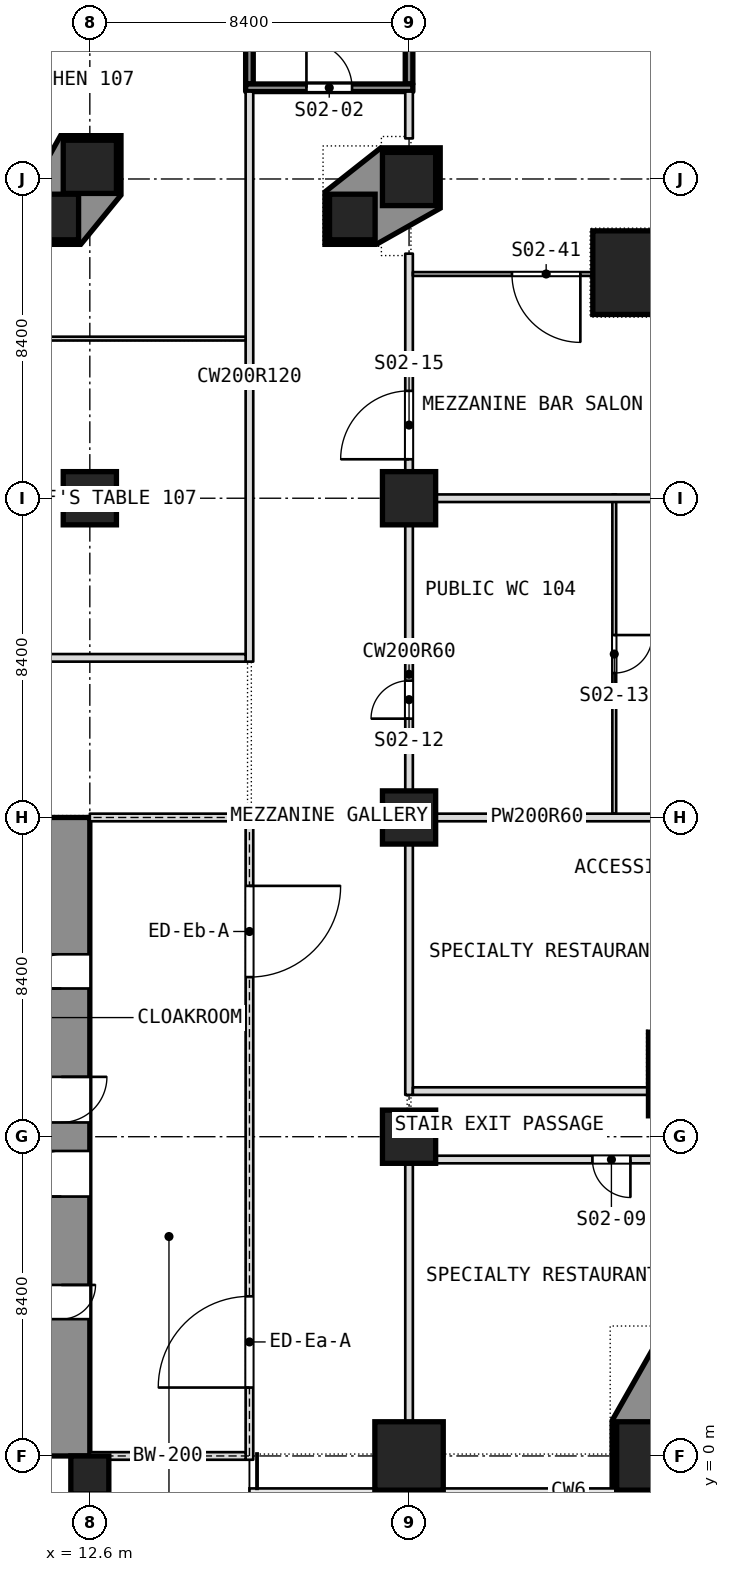
"""IFC4 building model, lengths in metres.
Left out: names, types, materials, properties, quantities, classifications, styles, units other than length and angle.
Written with IfcOpenShell. Run it as: python <this file> out.ifc"""

import sys

from ifc_helpers import new_model, si_unit, direction, frame, frame_2d, origin, origin_2d, place, context, subcontext, project, spatial, polyline, rectangle, outline, extrude, element, fill, save


model = new_model("IFC4")
c1 = context("Model", 3, precision=1e-05, world=origin(), true_north=direction((0.0, 1.0)))
c2 = subcontext(c1, "Body", "Model", "MODEL_VIEW")
j1 = project(units=[si_unit("LENGTHUNIT", "METRE"), si_unit("PLANEANGLEUNIT", "RADIAN")], contexts=[c1])
p1 = place(None, origin())
s1 = spatial("IfcSite", under=j1, at=p1, CompositionType="ELEMENT")
p2 = place(p1, origin())
s2 = spatial("IfcBuilding", under=s1, at=p2, CompositionType="ELEMENT")
p3 = place(p2, frame((0.0, 0.0, 8.0)))
s3 = spatial("IfcBuildingStorey", under=s2, at=p3, CompositionType="ELEMENT", Elevation=8.0)
p4 = place(p3, frame((21.0, 0.0, 0.0), z_axis=(0.0, 0.0, 1.0), x_axis=(1.0, 0.0, 0.0)))
e1 = element("IfcColumn", 1, at=p4, inside=s3, PredefinedType="COLUMN", context=c2, shape_type="SweptSolid", body=[
    extrude(rectangle(XDim=1.8, YDim=1.8, at=origin_2d()), origin(), (0.0, 0.0, 1.0), 5.0),
])
for number, where, z_axis, x_axis in (
    (2, (21.0, 8.4, 0.0), (0.0, 0.0, 1.0), (1.0, 0.0, 0.0)),
    (3, (21.0, 16.8, 0.0), (0.0, 0.0, 1.0), (1.0, 0.0, 0.0)),
    (4, (12.6, 25.2, 0.0), (0.0, 0.0, 1.0), (1.0, 0.0, 0.0)),
    (5, (21.0, 25.2, 0.0), (0.0, 0.0, 1.0), (1.0, 0.0, 0.0)),
    (6, (12.6, 33.92, 0.0), (0.0, 0.0, 1.0), (1.0, 0.0, 0.0)),
    (7, (21.0, 33.6, 0.0), (0.0, 0.0, 1.0), (1.0, 0.0, 0.0)),
):
    element("IfcColumn", number, at=place(p3, frame(where, z_axis=z_axis, x_axis=x_axis)), inside=s3, PredefinedType="COLUMN", context=c2, shape_type="SweptSolid", body=[
        extrude(rectangle(XDim=1.4, YDim=1.4, at=origin_2d()), origin(), (0.0, 0.0, 1.0), 5.0),
    ])
p5 = place(p3, frame((27.363, 0.0, 0.0), z_axis=(0.0, 0.0, 1.0), x_axis=(1.0, 0.0, 0.0)))
e8 = element("IfcColumn", 8, at=p5, inside=s3, PredefinedType="COLUMN", context=c2, shape_type="SweptSolid", body=[
    extrude(rectangle(XDim=1.8, YDim=1.8, at=origin_2d()), origin(), (0.0, 0.0, 1.0), 5.0),
])
for number, where, z_axis, x_axis in (
    (9, (28.4, 10.05, 0.0), (0.0, 0.0, 1.0), (1.0, 0.0, 0.0)),
    (10, (26.936, 31.135, 0.0), (0.0, 0.0, 1.0), (1.0, 0.0, 0.0)),
):
    element("IfcColumn", number, at=place(p3, frame(where, z_axis=z_axis, x_axis=x_axis)), inside=s3, PredefinedType="COLUMN", context=c2, shape_type="SweptSolid", body=[
        extrude(rectangle(XDim=2.2, YDim=2.2, at=origin_2d()), origin(), (0.0, 0.0, 1.0), 5.0),
    ])
p6 = place(p3, frame((11.85, 0.0, 0.0), z_axis=(0.0, 0.0, 1.0), x_axis=(0.0, 1.0, 0.0)))
e11 = element("IfcWall", 11, at=p6, inside=s3, PredefinedType="SHEAR", context=c2, shape_type="SweptSolid", body=[
    extrude(rectangle(XDim=16.8, YDim=1.5, at=frame_2d((8.4, 0.0))), origin(), (0.0, 0.0, 1.0), 5.0),
])
p7 = place(p6, frame((3.6, 0.0, 0.0)))
e12 = element("IfcOpeningElement", 12, at=p7, cuts=e11, PredefinedType="OPENING", context=c2, shape_type="SweptSolid", body=[
    extrude(rectangle(XDim=0.9, YDim=2.1, at=frame_2d((0.45, 1.05))), frame((0.0, 0.75, 0.0), z_axis=(0.0, -1.0, 0.0), x_axis=(1.0, 0.0, 0.0)), (0.0, 0.0, 1.0), 1.5),
])
p8 = place(p6, frame((6.825, 0.0, 0.0)))
e13 = element("IfcOpeningElement", 13, at=p8, cuts=e11, PredefinedType="OPENING", context=c2, shape_type="SweptSolid", body=[
    extrude(rectangle(XDim=1.2, YDim=2.1, at=frame_2d((0.6, 1.05))), frame((0.0, 0.75, 0.0), z_axis=(0.0, -1.0, 0.0), x_axis=(1.0, 0.0, 0.0)), (0.0, 0.0, 1.0), 1.5),
])
p9 = place(p6, frame((12.3, 0.0, 0.0)))
e14 = element("IfcOpeningElement", 14, at=p9, cuts=e11, PredefinedType="OPENING", context=c2, shape_type="SweptSolid", body=[
    extrude(rectangle(XDim=0.9, YDim=2.1, at=frame_2d((0.45, 1.05))), frame((0.0, 0.75, 0.0), z_axis=(0.0, -1.0, 0.0), x_axis=(1.0, 0.0, 0.0)), (0.0, 0.0, 1.0), 1.5),
])
p10 = place(p6, frame((8.775, 0.0, 0.0)))
e15 = element("IfcOpeningElement", 15, at=p10, cuts=e11, PredefinedType="OPENING", context=c2, shape_type="SweptSolid", body=[
    extrude(rectangle(XDim=1.2, YDim=2.1, at=frame_2d((0.6, 1.05))), frame((0.0, 0.75, 0.0), z_axis=(0.0, -1.0, 0.0), x_axis=(1.0, 0.0, 0.0)), (0.0, 0.0, 1.0), 1.5),
])
for number, where, z_axis, x_axis in (
    (16, (11.704, 32.6, 0.0), (0.0, 0.0, 1.0), (1.0, 0.0, 0.0)),
    (17, (19.507, 32.6, 0.0), (0.0, 0.0, 1.0), (1.0, 0.0, 0.0)),
):
    element("IfcColumn", number, at=place(p3, frame(where, z_axis=z_axis, x_axis=x_axis)), inside=s3, PredefinedType="COLUMN", context=c2, shape_type="SweptSolid", body=[
        extrude(rectangle(XDim=1.2, YDim=1.2, at=origin_2d()), origin(), (0.0, 0.0, 1.0), 5.0),
    ])
p11 = place(p3, frame((12.6, -0.5, 0.0), z_axis=(0.0, 0.0, 1.0), x_axis=(1.0, 0.0, 0.0)))
e18 = element("IfcColumn", 18, at=p11, inside=s3, PredefinedType="COLUMN", context=c2, shape_type="SweptSolid", body=[
    extrude(rectangle(XDim=1.0, YDim=1.0, at=origin_2d()), origin(), (0.0, 0.0, 1.0), 5.0),
])
p12 = place(p3, frame((26.4, 16.9, 0.0), z_axis=(0.0, 0.0, 1.0), x_axis=(0.0, 1.0, 0.0)))
e19 = element("IfcWall", 19, at=p12, inside=s3, PredefinedType="PARTITIONING", context=c2, shape_type="SweptSolid", body=[
    extrude(rectangle(XDim=8.4, YDim=0.1, at=frame_2d((4.2, 0.0))), origin(), (0.0, 0.0, 1.0), 4.68),
])
p13 = place(p12, frame((3.7, 0.0, 0.0)))
e20 = element("IfcOpeningElement", 20, at=p13, cuts=e19, PredefinedType="OPENING", context=c2, shape_type="SweptSolid", body=[
    extrude(rectangle(XDim=1.0, YDim=2.1, at=frame_2d((0.5, 1.05))), frame((0.0, 0.05, 0.0), z_axis=(0.0, -1.0, 0.0), x_axis=(1.0, 0.0, 0.0)), (0.0, 0.0, 1.0), 0.1),
])
p14 = place(p3, frame((21.0, -0.894, 0.0), z_axis=(0.0, 0.0, 1.0), x_axis=(0.0, 1.0, 0.0)))
e21 = element("IfcWall", 21, at=p14, inside=s3, PredefinedType="PARTITIONING", context=c2, shape_type="SweptSolid", body=[
    extrude(rectangle(XDim=8.794, YDim=0.2, at=frame_2d((4.397, 0.0))), origin(), (0.0, 0.0, 1.0), 4.68),
])
p15 = place(p3, frame((21.0, 9.5, 0.0), z_axis=(0.0, 0.0, 1.0), x_axis=(0.0, 1.0, 0.0)))
e22 = element("IfcWall", 22, at=p15, inside=s3, PredefinedType="PARTITIONING", context=c2, shape_type="SweptSolid", body=[
    extrude(rectangle(XDim=22.135, YDim=0.2, at=frame_2d((11.067, 0.0))), origin(), (0.0, 0.0, 1.0), 4.68),
])
p16 = place(p15, frame((9.9, 0.0, 0.0)))
e23 = element("IfcOpeningElement", 23, at=p16, cuts=e22, PredefinedType="OPENING", context=c2, shape_type="SweptSolid", body=[
    extrude(rectangle(XDim=1.0, YDim=2.1, at=frame_2d((0.5, 1.05))), frame((0.0, 0.1, 0.0), z_axis=(0.0, -1.0, 0.0), x_axis=(1.0, 0.0, 0.0)), (0.0, 0.0, 1.0), 0.2),
])
p17 = place(p15, frame((16.725, 0.0, 0.0)))
e24 = element("IfcOpeningElement", 24, at=p17, cuts=e22, PredefinedType="OPENING", context=c2, shape_type="SweptSolid", body=[
    extrude(rectangle(XDim=1.8, YDim=2.1, at=frame_2d((0.9, 1.05))), frame((0.0, 0.1, 0.0), z_axis=(0.0, -1.0, 0.0), x_axis=(1.0, 0.0, 0.0)), (0.0, 0.0, 1.0), 0.2),
])
p18 = place(p3, frame((21.0, 34.668, 0.0), z_axis=(0.0, 0.0, 1.0), x_axis=(0.0, 1.0, 0.0)))
e25 = element("IfcWall", 25, at=p18, inside=s3, PredefinedType="PARTITIONING", context=c2, shape_type="SweptSolid", body=[
    extrude(rectangle(XDim=1.232, YDim=0.2, at=frame_2d((0.616, 0.0))), origin(), (0.0, 0.0, 1.0), 4.68),
])
p19 = place(p3, frame((21.0, 36.1, 0.0), z_axis=(0.0, 0.0, 1.0), x_axis=(0.0, 1.0, 0.0)))
e26 = element("IfcWall", 26, at=p19, inside=s3, PredefinedType="PARTITIONING", context=c2, shape_type="SweptSolid", body=[
    extrude(rectangle(XDim=6.2, YDim=0.2, at=frame_2d((3.1, 0.0))), origin(), (0.0, 0.0, 1.0), 4.68),
])
p20 = place(p3, frame((16.8, 20.9, 0.0), z_axis=(0.0, 0.0, 1.0), x_axis=(0.0, 1.0, 0.0)))
e27 = element("IfcWall", 27, at=p20, inside=s3, PredefinedType="PARTITIONING", context=c2, shape_type="SweptSolid", body=[
    extrude(rectangle(XDim=15.0, YDim=0.2, at=frame_2d((7.5, 0.0))), origin(), (0.0, 0.0, 1.0), 4.68),
])
p21 = place(p3, frame((16.8, 36.1, 0.0), z_axis=(0.0, 0.0, 1.0), x_axis=(0.0, 1.0, 0.0)))
e28 = element("IfcWall", 28, at=p21, inside=s3, PredefinedType="PARTITIONING", context=c2, shape_type="SweptSolid", body=[
    extrude(rectangle(XDim=5.84, YDim=0.2, at=frame_2d((2.92, 0.0))), origin(), (0.0, 0.0, 1.0), 4.68),
])
p22 = place(p3, frame((21.1, 7.8, 0.0), z_axis=(0.0, 0.0, 1.0), x_axis=(1.0, 0.0, 0.0)))
e29 = element("IfcWall", 29, at=p22, inside=s3, PredefinedType="PARTITIONING", context=c2, shape_type="SweptSolid", body=[
    extrude(rectangle(XDim=17.0, YDim=0.2, at=frame_2d((8.5, 0.0))), origin(), (0.0, 0.0, 1.0), 4.68),
])
p23 = place(p22, frame((4.725, 0.0, 0.0)))
e30 = element("IfcOpeningElement", 30, at=p23, cuts=e29, PredefinedType="OPENING", context=c2, shape_type="SweptSolid", body=[
    extrude(rectangle(XDim=1.0, YDim=2.1, at=frame_2d((0.5, 1.05))), frame((0.0, 0.1, 0.0), z_axis=(0.0, -1.0, 0.0), x_axis=(1.0, 0.0, 0.0)), (0.0, 0.0, 1.0), 0.2),
])
p24 = place(p3, frame((21.1, 9.6, 0.0), z_axis=(0.0, 0.0, 1.0), x_axis=(1.0, 0.0, 0.0)))
e31 = element("IfcWall", 31, at=p24, inside=s3, PredefinedType="PARTITIONING", context=c2, shape_type="SweptSolid", body=[
    extrude(rectangle(XDim=6.2, YDim=0.2, at=frame_2d((3.1, 0.0))), origin(), (0.0, 0.0, 1.0), 4.68),
])
p25 = place(p3, frame((21.1, 16.8, 0.0), z_axis=(0.0, 0.0, 1.0), x_axis=(1.0, 0.0, 0.0)))
e32 = element("IfcWall", 32, at=p25, inside=s3, PredefinedType="PARTITIONING", context=c2, shape_type="SweptSolid", body=[
    extrude(rectangle(XDim=6.53, YDim=0.2, at=frame_2d((3.265, 0.0))), origin(), (0.0, 0.0, 1.0), 4.68),
])
p26 = place(p3, frame((-16.7, 21.0, 0.0), z_axis=(0.0, 0.0, 1.0), x_axis=(1.0, 0.0, 0.0)))
e33 = element("IfcWall", 33, at=p26, inside=s3, PredefinedType="PARTITIONING", context=c2, shape_type="SweptSolid", body=[
    extrude(rectangle(XDim=33.4, YDim=0.2, at=frame_2d((16.7, 0.0))), origin(), (0.0, 0.0, 1.0), 4.68),
])
p27 = place(p26, frame((7.425, 0.0, 0.0)))
e34 = element("IfcOpeningElement", 34, at=p27, cuts=e33, PredefinedType="OPENING", context=c2, shape_type="SweptSolid", body=[
    extrude(rectangle(XDim=1.8, YDim=2.1, at=frame_2d((0.9, 1.05))), frame((0.0, 0.1, 0.0), z_axis=(0.0, -1.0, 0.0), x_axis=(1.0, 0.0, 0.0)), (0.0, 0.0, 1.0), 0.2),
])
p28 = place(p26, frame((1.175, 0.0, 0.0)))
e35 = element("IfcOpeningElement", 35, at=p28, cuts=e33, PredefinedType="OPENING", context=c2, shape_type="SweptSolid", body=[
    extrude(rectangle(XDim=1.8, YDim=2.1, at=frame_2d((0.9, 1.05))), frame((0.0, 0.1, 0.0), z_axis=(0.0, -1.0, 0.0), x_axis=(1.0, 0.0, 0.0)), (0.0, 0.0, 1.0), 0.2),
])
p29 = place(p26, frame((15.8, 0.0, 0.0)))
e36 = element("IfcOpeningElement", 36, at=p29, cuts=e33, PredefinedType="OPENING", context=c2, shape_type="SweptSolid", body=[
    extrude(rectangle(XDim=1.8, YDim=2.1, at=frame_2d((0.9, 1.05))), frame((0.0, 0.1, 0.0), z_axis=(0.0, -1.0, 0.0), x_axis=(1.0, 0.0, 0.0)), (0.0, 0.0, 1.0), 0.2),
])
p30 = place(p26, frame((26.2, 0.0, 0.0)))
e37 = element("IfcOpeningElement", 37, at=p30, cuts=e33, PredefinedType="OPENING", context=c2, shape_type="SweptSolid", body=[
    extrude(rectangle(XDim=1.8, YDim=2.1, at=frame_2d((0.9, 1.05))), frame((0.0, 0.1, 0.0), z_axis=(0.0, -1.0, 0.0), x_axis=(1.0, 0.0, 0.0)), (0.0, 0.0, 1.0), 0.2),
])
p31 = place(p3, frame((21.1, 25.2, 0.0), z_axis=(0.0, 0.0, 1.0), x_axis=(1.0, 0.0, 0.0)))
e38 = element("IfcWall", 38, at=p31, inside=s3, PredefinedType="PARTITIONING", context=c2, shape_type="SweptSolid", body=[
    extrude(rectangle(XDim=6.737, YDim=0.2, at=frame_2d((3.368, 0.0))), origin(), (0.0, 0.0, 1.0), 4.68),
])
p32 = place(p3, frame((4.3, 29.4, 0.0), z_axis=(0.0, 0.0, 1.0), x_axis=(1.0, 0.0, 0.0)))
e39 = element("IfcWall", 39, at=p32, inside=s3, PredefinedType="PARTITIONING", context=c2, shape_type="SweptSolid", body=[
    extrude(rectangle(XDim=12.4, YDim=0.1, at=frame_2d((6.2, 0.0))), origin(), (0.0, 0.0, 1.0), 4.68),
])
p33 = place(p32, frame((5.6, 0.0, 0.0)))
e40 = element("IfcOpeningElement", 40, at=p33, cuts=e39, PredefinedType="OPENING", context=c2, shape_type="SweptSolid", body=[
    extrude(rectangle(XDim=1.2, YDim=2.1, at=frame_2d((0.6, 1.05))), frame((0.0, 0.05, 0.0), z_axis=(0.0, -1.0, 0.0), x_axis=(1.0, 0.0, 0.0)), (0.0, 0.0, 1.0), 0.1),
])
p34 = place(p3, frame((21.1, 31.1, 0.0), z_axis=(0.0, 0.0, 1.0), x_axis=(1.0, 0.0, 0.0)))
e41 = element("IfcWall", 41, at=p34, inside=s3, PredefinedType="PARTITIONING", context=c2, shape_type="SweptSolid", body=[
    extrude(rectangle(XDim=4.716, YDim=0.1, at=frame_2d((2.358, 0.0))), origin(), (0.0, 0.0, 1.0), 4.68),
])
p35 = place(p34, frame((2.608, 0.0, 0.0)))
e42 = element("IfcOpeningElement", 42, at=p35, cuts=e41, PredefinedType="OPENING", context=c2, shape_type="SweptSolid", body=[
    extrude(rectangle(XDim=1.8, YDim=2.1, at=frame_2d((0.9, 1.05))), frame((0.0, 0.05, 0.0), z_axis=(0.0, -1.0, 0.0), x_axis=(1.0, 0.0, 0.0)), (0.0, 0.0, 1.0), 0.1),
])
p36 = place(p3, frame((16.7, 36.0, 0.0), z_axis=(0.0, 0.0, 1.0), x_axis=(1.0, 0.0, 0.0)))
e43 = element("IfcWall", 43, at=p36, inside=s3, PredefinedType="PARTITIONING", context=c2, shape_type="SweptSolid", body=[
    extrude(rectangle(XDim=4.4, YDim=0.2, at=frame_2d((2.2, 0.0))), origin(), (0.0, 0.0, 1.0), 4.68),
])
p37 = place(p36, frame((1.6, 0.0, 0.0)))
e44 = element("IfcOpeningElement", 44, at=p37, cuts=e43, PredefinedType="OPENING", context=c2, shape_type="SweptSolid", body=[
    extrude(rectangle(XDim=1.2, YDim=2.1, at=frame_2d((0.6, 1.05))), frame((0.0, 0.1, 0.0), z_axis=(0.0, -1.0, 0.0), x_axis=(1.0, 0.0, 0.0)), (0.0, 0.0, 1.0), 0.2),
])
p38 = place(p3, frame((16.8, -0.1, 0.0), z_axis=(0.0, 0.0, 1.0), x_axis=(0.0, 1.0, 0.0)))
e45 = element("IfcWall", 45, at=p38, inside=s3, PredefinedType="PARTITIONING", context=c2, shape_type="SweptSolid", body=[
    extrude(rectangle(XDim=17.0, YDim=0.2, at=frame_2d((8.5, 0.0))), origin(), (0.0, 0.0, 1.0), 4.78),
])
p39 = place(p38, frame((1.9, 0.0, 0.0)))
e46 = element("IfcOpeningElement", 46, at=p39, cuts=e45, PredefinedType="OPENING", context=c2, shape_type="SweptSolid", body=[
    extrude(rectangle(XDim=2.4, YDim=2.1, at=frame_2d((1.2, 1.05))), frame((0.0, 0.1, 0.0), z_axis=(0.0, -1.0, 0.0), x_axis=(1.0, 0.0, 0.0)), (0.0, 0.0, 1.0), 0.2),
])
p40 = place(p38, frame((12.7, 0.0, 0.0)))
e47 = element("IfcOpeningElement", 47, at=p40, cuts=e45, PredefinedType="OPENING", context=c2, shape_type="SweptSolid", body=[
    extrude(rectangle(XDim=2.4, YDim=2.1, at=frame_2d((1.2, 1.05))), frame((0.0, 0.1, 0.0), z_axis=(0.0, -1.0, 0.0), x_axis=(1.0, 0.0, 0.0)), (0.0, 0.0, 1.0), 0.2),
])
for number, where, z_axis, x_axis in (
    (48, (12.6, 0.0, 0.0), (0.0, 0.0, 1.0), (1.0, 0.0, 0.0)),
    (49, (12.6, 16.8, 0.0), (0.0, 0.0, 1.0), (1.0, 0.0, 0.0)),
):
    element("IfcWall", number, at=place(p3, frame(where, z_axis=z_axis, x_axis=x_axis)), inside=s3, PredefinedType="PARTITIONING", context=c2, shape_type="SweptSolid", body=[
        extrude(rectangle(XDim=4.1, YDim=0.2, at=frame_2d((2.05, 0.0))), origin(), (0.0, 0.0, 1.0), 4.78),
    ])
p41 = place(p3, origin())
e50 = element("IfcWall", 50, at=p41, inside=s3, PredefinedType="SOLIDWALL", context=c2, shape_type="SweptSolid", body=[
    extrude(outline(polyline([(11.83, 34.74), (13.42, 34.74), (13.42, 33.177), (12.361, 31.88), (10.984, 31.88), (10.984, 33.231), (11.83, 34.74)]), holes=[polyline([(13.3, 33.22), (13.3, 34.62), (11.9, 34.62), (11.9, 33.22), (13.3, 33.22)]), polyline([(12.304, 32.0), (12.304, 33.2), (11.104, 33.2), (11.104, 32.0), (12.304, 32.0)])]), origin(), (0.0, 0.0, 1.0), 5.0),
])
p42 = place(p3, origin())
e51 = element("IfcWall", 51, at=p42, inside=s3, PredefinedType="SOLIDWALL", context=c2, shape_type="SweptSolid", body=[
    extrude(outline(polyline([(20.258, 34.42), (21.82, 34.42), (21.82, 32.83), (20.138, 31.88), (18.787, 31.88), (18.787, 33.258), (20.258, 34.42)]), holes=[polyline([(21.7, 32.9), (21.7, 34.3), (20.3, 34.3), (20.3, 32.9), (21.7, 32.9)]), polyline([(20.107, 32.0), (20.107, 33.2), (18.907, 33.2), (18.907, 32.0), (20.107, 32.0)])]), origin(), (0.0, 0.0, 1.0), 5.0),
])
p43 = place(p3, origin())
e52 = element("IfcWall", 52, at=p43, inside=s3, PredefinedType="SOLIDWALL", context=c2, shape_type="SweptSolid", body=[
    extrude(outline(polyline([(26.343, 0.932), (27.73, 3.369), (29.12, 3.369), (29.12, 2.034), (28.357, -1.02), (26.343, -1.02), (26.343, 0.932)]), holes=[polyline([(27.8, 2.049), (29.0, 2.049), (29.0, 3.249), (27.8, 3.249), (27.8, 2.049)]), polyline([(26.463, -0.9), (28.263, -0.9), (28.263, 0.9), (26.463, 0.9), (26.463, -0.9)])]), origin(), (0.0, 0.0, 1.0), 5.0),
])
p44 = place(p13, origin())
e53 = element("IfcDoor", 53, at=p44, inside=s3, OperationType="SINGLE_SWING_LEFT", PredefinedType="DOOR", context=c2, shape_type="SweptSolid", body=[
    extrude(rectangle(XDim=1.0, YDim=2.1, at=frame_2d((0.5, 1.05))), frame((0.0, 0.025, 0.0), z_axis=(0.0, -1.0, 0.0), x_axis=(1.0, 0.0, 0.0)), (0.0, 0.0, 1.0), 0.05),
])
fill(e20, e53)
p45 = place(p16, origin())
e54 = element("IfcDoor", 54, at=p45, inside=s3, OperationType="SINGLE_SWING_RIGHT", PredefinedType="DOOR", context=c2, shape_type="SweptSolid", body=[
    extrude(rectangle(XDim=1.0, YDim=2.1, at=frame_2d((0.5, 1.05))), frame((0.0, 0.025, 0.0), z_axis=(0.0, -1.0, 0.0), x_axis=(1.0, 0.0, 0.0)), (0.0, 0.0, 1.0), 0.05),
])
fill(e23, e54)
p46 = place(p17, origin())
e55 = element("IfcDoor", 55, at=p46, inside=s3, OperationType="DOUBLE_DOOR_SINGLE_SWING", PredefinedType="DOOR", context=c2, shape_type="SweptSolid", body=[
    extrude(rectangle(XDim=1.8, YDim=2.1, at=frame_2d((0.9, 1.05))), frame((0.0, 0.025, 0.0), z_axis=(0.0, -1.0, 0.0), x_axis=(1.0, 0.0, 0.0)), (0.0, 0.0, 1.0), 0.05),
])
fill(e24, e55)
p47 = place(p23, origin())
e56 = element("IfcDoor", 56, at=p47, inside=s3, OperationType="SINGLE_SWING_RIGHT", PredefinedType="DOOR", context=c2, shape_type="SweptSolid", body=[
    extrude(rectangle(XDim=1.0, YDim=2.1, at=frame_2d((0.5, 1.05))), frame((0.0, 0.025, 0.0), z_axis=(0.0, -1.0, 0.0), x_axis=(1.0, 0.0, 0.0)), (0.0, 0.0, 1.0), 0.05),
])
fill(e30, e56)
p48 = place(p35, origin())
e57 = element("IfcDoor", 57, at=p48, inside=s3, OperationType="DOUBLE_DOOR_SINGLE_SWING", PredefinedType="DOOR", context=c2, shape_type="SweptSolid", body=[
    extrude(rectangle(XDim=1.8, YDim=2.1, at=frame_2d((0.9, 1.05))), frame((0.0, 0.025, 0.0), z_axis=(0.0, -1.0, 0.0), x_axis=(1.0, 0.0, 0.0)), (0.0, 0.0, 1.0), 0.05),
])
fill(e42, e57)
p49 = place(p37, origin())
e58 = element("IfcDoor", 58, at=p49, inside=s3, OperationType="SINGLE_SWING_LEFT", PredefinedType="DOOR", context=c2, shape_type="SweptSolid", body=[
    extrude(rectangle(XDim=1.2, YDim=2.1, at=frame_2d((0.6, 1.05))), frame((0.0, 0.025, 0.0), z_axis=(0.0, -1.0, 0.0), x_axis=(1.0, 0.0, 0.0)), (0.0, 0.0, 1.0), 0.05),
])
fill(e44, e58)
p50 = place(p7, origin())
e59 = element("IfcDoor", 59, at=p50, inside=s3, OperationType="SINGLE_SWING_LEFT", PredefinedType="DOOR", context=c2, shape_type="SweptSolid", body=[
    extrude(rectangle(XDim=0.9, YDim=2.1, at=frame_2d((0.45, 1.05))), frame((0.0, 0.025, 0.0), z_axis=(0.0, -1.0, 0.0), x_axis=(1.0, 0.0, 0.0)), (0.0, 0.0, 1.0), 0.05),
])
fill(e12, e59)
p51 = place(p8, origin())
e60 = element("IfcDoor", 60, at=p51, inside=s3, OperationType="SINGLE_SWING_LEFT", PredefinedType="DOOR", context=c2, shape_type="SweptSolid", body=[
    extrude(rectangle(XDim=1.2, YDim=2.1, at=frame_2d((0.6, 1.05))), frame((0.0, 0.025, 0.0), z_axis=(0.0, -1.0, 0.0), x_axis=(1.0, 0.0, 0.0)), (0.0, 0.0, 1.0), 0.05),
])
fill(e13, e60)
p52 = place(p9, origin())
e61 = element("IfcDoor", 61, at=p52, inside=s3, OperationType="SINGLE_SWING_LEFT", PredefinedType="DOOR", context=c2, shape_type="SweptSolid", body=[
    extrude(rectangle(XDim=0.9, YDim=2.1, at=frame_2d((0.45, 1.05))), frame((0.0, 0.025, 0.0), z_axis=(0.0, -1.0, 0.0), x_axis=(1.0, 0.0, 0.0)), (0.0, 0.0, 1.0), 0.05),
])
fill(e14, e61)
p53 = place(p10, origin())
e62 = element("IfcDoor", 62, at=p53, inside=s3, OperationType="SINGLE_SWING_LEFT", PredefinedType="DOOR", context=c2, shape_type="SweptSolid", body=[
    extrude(rectangle(XDim=1.2, YDim=2.1, at=frame_2d((0.6, 1.05))), frame((0.0, 0.025, 0.0), z_axis=(0.0, -1.0, 0.0), x_axis=(1.0, 0.0, 0.0)), (0.0, 0.0, 1.0), 0.05),
])
fill(e15, e62)
p54 = place(p39, origin())
e63 = element("IfcDoor", 63, at=p54, inside=s3, OperationType="DOUBLE_DOOR_SINGLE_SWING", PredefinedType="DOOR", context=c2, shape_type="SweptSolid", body=[
    extrude(rectangle(XDim=2.4, YDim=2.1, at=frame_2d((1.2, 1.05))), frame((0.0, 0.025, 0.0), z_axis=(0.0, -1.0, 0.0), x_axis=(1.0, 0.0, 0.0)), (0.0, 0.0, 1.0), 0.05),
])
fill(e46, e63)
p55 = place(p40, origin())
e64 = element("IfcDoor", 64, at=p55, inside=s3, OperationType="DOUBLE_DOOR_SINGLE_SWING", PredefinedType="DOOR", context=c2, shape_type="SweptSolid", body=[
    extrude(rectangle(XDim=2.4, YDim=2.1, at=frame_2d((1.2, 1.05))), frame((0.0, 0.025, 0.0), z_axis=(0.0, -1.0, 0.0), x_axis=(1.0, 0.0, 0.0)), (0.0, 0.0, 1.0), 0.05),
])
fill(e47, e64)
save(model, sys.argv[1])
